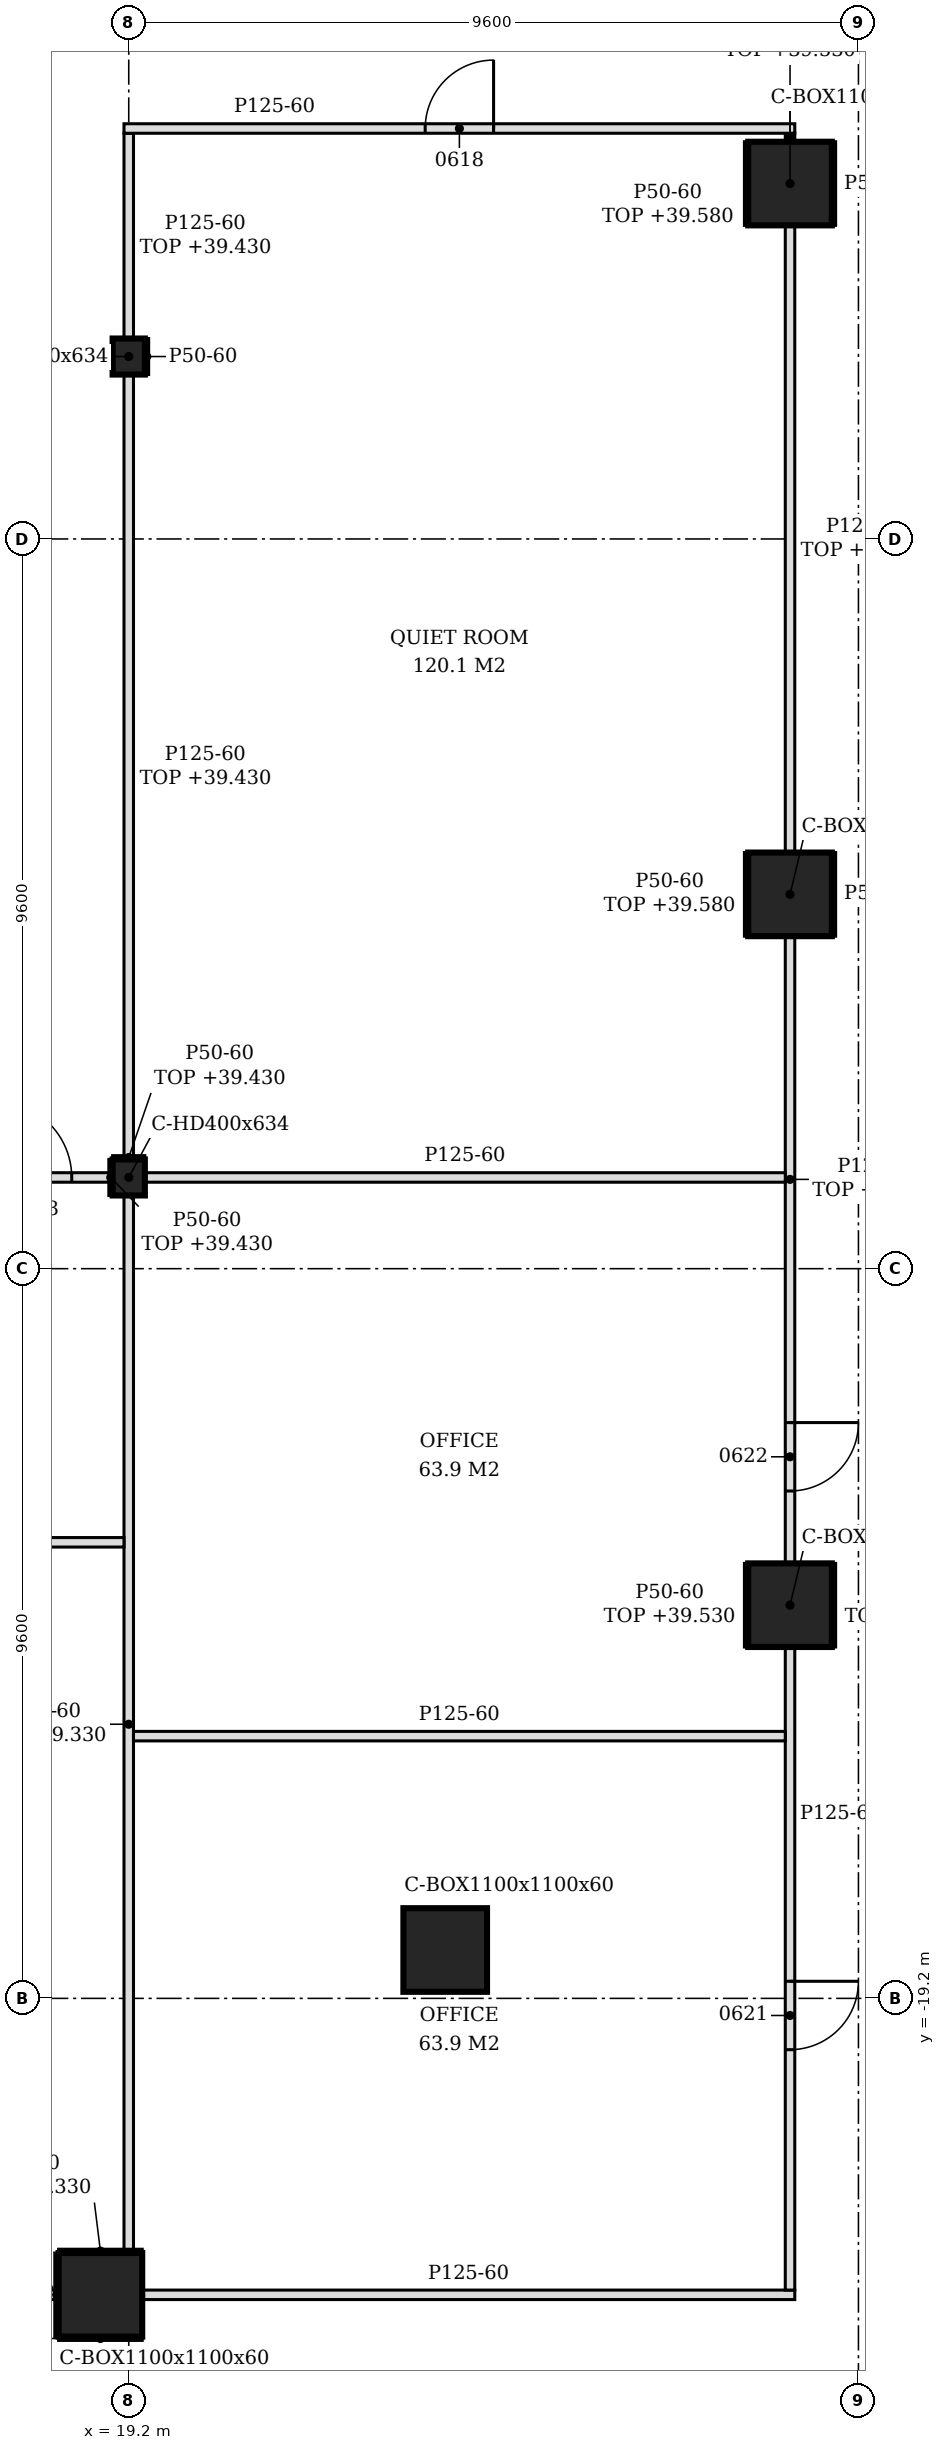
"""IFC4 building model, lengths in metres.
Left out: names, types, materials, properties, quantities, classifications, styles, units other than length and angle.
Written with IfcOpenShell. Run it as: python <this file> out.ifc"""

import sys

from ifc_helpers import new_model, si_unit, direction, frame, frame_2d, origin, origin_2d, place, context, subcontext, project, spatial, polyline, rectangle, hollow_rectangle, i_section, outline, extrude, element, fill, save


model = new_model("IFC4")
c1 = context("Model", 3, precision=1e-05, world=origin(), true_north=direction((0.0, 1.0)))
c2 = subcontext(c1, "Body", "Model", "MODEL_VIEW")
j1 = project(units=[si_unit("LENGTHUNIT", "METRE"), si_unit("PLANEANGLEUNIT", "RADIAN")], contexts=[c1])
p1 = place(None, origin())
s1 = spatial("IfcSite", under=j1, at=p1, CompositionType="ELEMENT")
p2 = place(p1, origin())
s2 = spatial("IfcBuilding", under=s1, at=p2, CompositionType="ELEMENT")
p3 = place(p2, frame((0.0, 0.0, 35.4)))
s3 = spatial("IfcBuildingStorey", under=s2, at=p3, CompositionType="ELEMENT", Elevation=35.4)
for number, where, z_axis, x_axis in (
    (1, (18.827, -23.1, -0.2), (0.0, 0.0, 1.0), (1.0, 0.0, 0.0)),
    (2, (23.364, -18.564, -0.2), (0.0, 0.0, 1.0), (1.0, 0.0, 0.0)),
    (3, (27.9, -14.027, -0.2), (0.0, 0.0, 1.0), (1.0, 0.0, 0.0)),
    (4, (27.9, -4.676, -0.2), (0.0, 0.0, 1.0), (1.0, 0.0, 0.0)),
    (5, (27.9, 4.676, -0.2), (0.0, 0.0, 1.0), (1.0, 0.0, 0.0)),
):
    element("IfcColumn", number, at=place(p3, frame(where, z_axis=z_axis, x_axis=x_axis)), inside=s3, PredefinedType="COLUMN", context=c2, shape_type="SweptSolid", body=[
        extrude(hollow_rectangle(XDim=1.1, YDim=1.1, WallThickness=0.06, at=origin_2d()), origin(), (0.0, 0.0, 1.0), 4.85),
    ])
for number, where, z_axis, x_axis in (
    (6, (19.2, -8.4, -0.2), (0.0, 0.0, 1.0), (1.0, 0.0, 0.0)),
    (7, (19.2, 2.4, -0.2), (0.0, 0.0, 1.0), (1.0, 0.0, 0.0)),
):
    element("IfcColumn", number, at=place(p3, frame(where, z_axis=z_axis, x_axis=x_axis)), inside=s3, PredefinedType="COLUMN", context=c2, shape_type="SweptSolid", body=[
        extrude(i_section(OverallWidth=0.424, OverallDepth=0.474, WebThickness=0.048, FlangeThickness=0.077, FilletRadius=0.015, at=origin_2d()), origin(), (0.0, 0.0, 1.0), 4.85),
    ])
p4 = place(p3, frame((9.964, -23.1, 0.0), z_axis=(0.0, 0.0, 1.0), x_axis=(1.0, 0.0, 0.0)))
e8 = element("IfcWall", 8, at=p4, inside=s3, PredefinedType="PARTITIONING", context=c2, shape_type="SweptSolid", body=[
    extrude(rectangle(XDim=8.313, YDim=0.125, at=frame_2d((4.157, 0.0))), origin(), (0.0, 0.0, 1.0), 4.13),
])
p5 = place(p4, frame((3.986, 0.0, 0.0)))
e9 = element("IfcOpeningElement", 9, at=p5, cuts=e8, PredefinedType="OPENING", context=c2, shape_type="SweptSolid", body=[
    extrude(rectangle(XDim=0.9, YDim=2.1, at=frame_2d((0.45, 1.05))), frame((0.0, 0.073, 0.0), z_axis=(0.0, -1.0, 0.0), x_axis=(1.0, 0.0, 0.0)), (0.0, 0.0, 1.0), 0.145),
])
p6 = place(p3, frame((19.377, -23.1, 0.0), z_axis=(0.0, 0.0, 1.0), x_axis=(1.0, 0.0, 0.0)))
e10 = element("IfcWall", 10, at=p6, inside=s3, PredefinedType="PARTITIONING", context=c2, shape_type="SweptSolid", body=[
    extrude(rectangle(XDim=8.585, YDim=0.125, at=frame_2d((4.292, 0.0))), origin(), (0.0, 0.0, 1.0), 4.65),
])
p7 = place(p3, frame((27.9, -23.038, 0.0), z_axis=(0.0, 0.0, 1.0), x_axis=(0.0, 1.0, 0.0)))
e11 = element("IfcWall", 11, at=p7, inside=s3, PredefinedType="PARTITIONING", context=c2, shape_type="SweptSolid", body=[
    extrude(outline(polyline([(0.0, 0.0), (8.46, 0.0), (8.46, 4.65), (3.988, 4.65), (3.986, 4.03), (3.688, 4.03), (3.686, 4.65), (0.0, 4.65), (0.0, 0.0)])), frame((0.0, 0.062, 0.0), z_axis=(0.0, -1.0, 0.0), x_axis=(1.0, 0.0, 0.0)), (0.0, 0.0, 1.0), 0.125),
])
p8 = place(p7, frame((3.163, 0.0, 0.0)))
e12 = element("IfcOpeningElement", 12, at=p8, cuts=e11, PredefinedType="OPENING", context=c2, shape_type="SweptSolid", body=[
    extrude(rectangle(XDim=0.9, YDim=2.1, at=frame_2d((0.45, 1.05))), frame((0.0, 0.073, 0.0), z_axis=(0.0, -1.0, 0.0), x_axis=(1.0, 0.0, 0.0)), (0.0, 0.0, 1.0), 0.145),
])
p9 = place(p3, frame((19.2, -22.55, 0.0), z_axis=(0.0, 0.0, 1.0), x_axis=(0.0, 1.0, 0.0)))
e13 = element("IfcWall", 13, at=p9, inside=s3, PredefinedType="PARTITIONING", context=c2, shape_type="SweptSolid", body=[
    extrude(rectangle(XDim=13.913, YDim=0.125, at=frame_2d((6.957, 0.0))), origin(), (0.0, 0.0, 1.0), 3.93),
])
p10 = place(p3, frame((19.262, -15.75, 0.0), z_axis=(0.0, 0.0, 1.0), x_axis=(1.0, 0.0, 0.0)))
e14 = element("IfcWall", 14, at=p10, inside=s3, PredefinedType="PARTITIONING", context=c2, shape_type="SweptSolid", body=[
    extrude(outline(polyline([(0.0, 0.0), (8.575, 0.0), (8.575, 4.65), (7.189, 4.65), (7.187, 4.13), (6.64, 4.13), (6.638, 4.65), (0.087, 4.65), (0.085, 3.93), (0.0, 3.93), (0.0, 0.0)])), frame((0.0, 0.062, 0.0), z_axis=(0.0, -1.0, 0.0), x_axis=(1.0, 0.0, 0.0)), (0.0, 0.0, 1.0), 0.125),
])
p11 = place(p3, frame((27.9, -13.477, 0.0), z_axis=(0.0, 0.0, 1.0), x_axis=(0.0, 1.0, 0.0)))
e15 = element("IfcWall", 15, at=p11, inside=s3, PredefinedType="PARTITIONING", context=c2, shape_type="SweptSolid", body=[
    extrude(rectangle(XDim=8.252, YDim=0.125, at=frame_2d((4.126, 0.0))), origin(), (0.0, 0.0, 1.0), 4.13),
])
p12 = place(p11, frame((0.952, 0.0, 0.0)))
e16 = element("IfcOpeningElement", 16, at=p12, cuts=e15, PredefinedType="OPENING", context=c2, shape_type="SweptSolid", body=[
    extrude(rectangle(XDim=0.9, YDim=2.1, at=frame_2d((0.45, 1.05))), frame((0.0, 0.073, 0.0), z_axis=(0.0, -1.0, 0.0), x_axis=(1.0, 0.0, 0.0)), (0.0, 0.0, 1.0), 0.145),
])
p13 = place(p3, frame((-4.738, -13.2, 0.0), z_axis=(0.0, 0.0, 1.0), x_axis=(1.0, 0.0, 0.0)))
e17 = element("IfcWall", 17, at=p13, inside=s3, PredefinedType="PARTITIONING", context=c2, shape_type="SweptSolid", body=[
    extrude(outline(polyline([(0.0, 0.0), (23.875, 0.0), (23.875, 3.93), (23.788, 3.93), (23.785, 4.65), (12.087, 4.65), (12.085, 3.93), (11.788, 3.93), (11.785, 4.65), (0.087, 4.65), (0.085, 3.93), (0.0, 3.93), (0.0, 0.0)])), frame((0.0, 0.062, 0.0), z_axis=(0.0, -1.0, 0.0), x_axis=(1.0, 0.0, 0.0)), (0.0, 0.0, 1.0), 0.125),
])
p14 = place(p3, frame((7.412, -8.4, 0.0), z_axis=(0.0, 0.0, 1.0), x_axis=(1.0, 0.0, 0.0)))
e18 = element("IfcWall", 18, at=p14, inside=s3, PredefinedType="PARTITIONING", context=c2, shape_type="SweptSolid", body=[
    extrude(rectangle(XDim=11.576, YDim=0.125, at=frame_2d((5.788, 0.0))), origin(), (0.0, 0.0, 1.0), 4.03),
])
p15 = place(p14, frame((4.138, 0.0, 0.0)))
e19 = element("IfcOpeningElement", 19, at=p15, cuts=e18, PredefinedType="OPENING", context=c2, shape_type="SweptSolid", body=[
    extrude(rectangle(XDim=0.8, YDim=2.1, at=frame_2d((0.4, 1.05))), frame((0.0, 0.073, 0.0), z_axis=(0.0, -1.0, 0.0), x_axis=(1.0, 0.0, 0.0)), (0.0, 0.0, 1.0), 0.145),
])
p16 = place(p14, frame((10.038, 0.0, 0.0)))
e20 = element("IfcOpeningElement", 20, at=p16, cuts=e18, PredefinedType="OPENING", context=c2, shape_type="SweptSolid", body=[
    extrude(rectangle(XDim=1.0, YDim=2.1, at=frame_2d((0.5, 1.05))), frame((0.0, 0.073, 0.0), z_axis=(0.0, -1.0, 0.0), x_axis=(1.0, 0.0, 0.0)), (0.0, 0.0, 1.0), 0.145),
])
p17 = place(p3, frame((19.412, -8.4, 0.0), z_axis=(0.0, 0.0, 1.0), x_axis=(1.0, 0.0, 0.0)))
e21 = element("IfcWall", 21, at=p17, inside=s3, PredefinedType="PARTITIONING", context=c2, shape_type="SweptSolid", body=[
    extrude(outline(polyline([(0.0, 0.0), (8.425, 0.0), (8.426, 4.13), (8.338, 4.13), (8.336, 4.65), (0.0, 4.65), (0.0, 0.0)])), frame((0.0, 0.062, 0.0), z_axis=(0.0, -1.0, 0.0), x_axis=(1.0, 0.0, 0.0)), (0.0, 0.0, 1.0), 0.125),
])
p18 = place(p3, frame((19.2, -8.163, 0.0), z_axis=(0.0, 0.0, 1.0), x_axis=(0.0, 1.0, 0.0)))
e22 = element("IfcWall", 22, at=p18, inside=s3, PredefinedType="PARTITIONING", context=c2, shape_type="SweptSolid", body=[
    extrude(rectangle(XDim=10.326, YDim=0.125, at=frame_2d((5.163, 0.0))), origin(), (0.0, 0.0, 1.0), 4.03),
])
p19 = place(p3, frame((27.9, -4.126, 0.0), z_axis=(0.0, 0.0, 1.0), x_axis=(0.0, 1.0, 0.0)))
e23 = element("IfcWall", 23, at=p19, inside=s3, PredefinedType="PARTITIONING", context=c2, shape_type="SweptSolid", body=[
    extrude(rectangle(XDim=8.251, YDim=0.125, at=frame_2d((4.126, 0.0))), origin(), (0.0, 0.0, 1.0), 4.13),
])
p20 = place(p3, frame((19.2, 2.637, 0.0), z_axis=(0.0, 0.0, 1.0), x_axis=(0.0, 1.0, 0.0)))
e24 = element("IfcWall", 24, at=p20, inside=s3, PredefinedType="PARTITIONING", context=c2, shape_type="SweptSolid", body=[
    extrude(rectangle(XDim=2.7, YDim=0.125, at=frame_2d((1.35, 0.0))), origin(), (0.0, 0.0, 1.0), 4.03),
])
p21 = place(p3, frame((27.9, 5.226, 0.0), z_axis=(0.0, 0.0, 1.0), x_axis=(0.0, 1.0, 0.0)))
e25 = element("IfcWall", 25, at=p21, inside=s3, PredefinedType="PARTITIONING", context=c2, shape_type="SweptSolid", body=[
    extrude(rectangle(XDim=0.112, YDim=0.125, at=frame_2d((0.056, 0.0))), origin(), (0.0, 0.0, 1.0), 4.13),
])
p22 = place(p3, frame((19.137, 5.4, 0.0), z_axis=(0.0, 0.0, 1.0), x_axis=(1.0, 0.0, 0.0)))
e26 = element("IfcWall", 26, at=p22, inside=s3, PredefinedType="PARTITIONING", context=c2, shape_type="SweptSolid", body=[
    extrude(outline(polyline([(0.0, 0.0), (8.825, 0.0), (8.825, 4.13), (8.613, 4.13), (8.611, 4.65), (0.212, 4.65), (0.21, 4.03), (0.0, 4.03), (0.0, 0.0)])), frame((0.0, 0.062, 0.0), z_axis=(0.0, -1.0, 0.0), x_axis=(1.0, 0.0, 0.0)), (0.0, 0.0, 1.0), 0.125),
])
p23 = place(p22, frame((3.962, 0.0, 0.0)))
e27 = element("IfcOpeningElement", 27, at=p23, cuts=e26, PredefinedType="OPENING", context=c2, shape_type="SweptSolid", body=[
    extrude(rectangle(XDim=0.9, YDim=2.1, at=frame_2d((0.45, 1.05))), frame((0.0, 0.073, 0.0), z_axis=(0.0, -1.0, 0.0), x_axis=(1.0, 0.0, 0.0)), (0.0, 0.0, 1.0), 0.145),
])
p24 = place(p3, frame((18.277, -22.525, 0.0), z_axis=(0.0, 0.0, 1.0), x_axis=(1.0, 0.0, 0.0)))
e28 = element("IfcWall", 28, at=p24, inside=s3, PredefinedType="PARTITIONING", context=c2, shape_type="SweptSolid", body=[
    extrude(rectangle(XDim=1.1, YDim=0.05, at=frame_2d((0.55, 0.0))), origin(), (0.0, 0.0, 1.0), 3.93),
])
p25 = place(p3, frame((18.277, -23.675, 0.0), z_axis=(0.0, 0.0, 1.0), x_axis=(1.0, 0.0, 0.0)))
e29 = element("IfcWall", 29, at=p25, inside=s3, PredefinedType="PARTITIONING", context=c2, shape_type="SweptSolid", body=[
    extrude(rectangle(XDim=1.1, YDim=0.05, at=frame_2d((0.55, 0.0))), origin(), (0.0, 0.0, 1.0), 4.27),
])
p26 = place(p3, frame((18.252, -23.65, 0.0), z_axis=(0.0, 0.0, 1.0), x_axis=(0.0, 1.0, 0.0)))
e30 = element("IfcWall", 30, at=p26, inside=s3, PredefinedType="PARTITIONING", context=c2, shape_type="SweptSolid", body=[
    extrude(rectangle(XDim=1.1, YDim=0.05, at=frame_2d((0.55, 0.0))), origin(), (0.0, 0.0, 1.0), 4.13),
])
p27 = place(p3, frame((18.963, -8.637, 0.0), z_axis=(0.0, 0.0, 1.0), x_axis=(0.0, 1.0, 0.0)))
e31 = element("IfcWall", 31, at=p27, inside=s3, PredefinedType="PARTITIONING", context=c2, shape_type="SweptSolid", body=[
    extrude(rectangle(XDim=0.474, YDim=0.05, at=frame_2d((0.237, 0.0))), origin(), (0.0, 0.0, 1.0), 4.03),
])
for number, where, z_axis, x_axis in (
    (32, (27.325, -14.577, 0.0), (0.0, 0.0, 1.0), (0.0, 1.0, 0.0)),
    (33, (28.475, -14.577, 0.0), (0.0, 0.0, 1.0), (0.0, 1.0, 0.0)),
):
    element("IfcWall", number, at=place(p3, frame(where, z_axis=z_axis, x_axis=x_axis)), inside=s3, PredefinedType="PARTITIONING", context=c2, shape_type="SweptSolid", body=[
        extrude(rectangle(XDim=1.1, YDim=0.05, at=frame_2d((0.55, 0.0))), origin(), (0.0, 0.0, 1.0), 4.13),
    ])
p28 = place(p3, frame((27.325, -5.226, 0.0), z_axis=(0.0, 0.0, 1.0), x_axis=(0.0, 1.0, 0.0)))
e34 = element("IfcWall", 34, at=p28, inside=s3, PredefinedType="PARTITIONING", context=c2, shape_type="SweptSolid", body=[
    extrude(rectangle(XDim=1.1, YDim=0.05, at=frame_2d((0.55, 0.0))), origin(), (0.0, 0.0, 1.0), 4.18),
])
p29 = place(p3, frame((28.475, -5.226, 0.0), z_axis=(0.0, 0.0, 1.0), x_axis=(0.0, 1.0, 0.0)))
e35 = element("IfcWall", 35, at=p29, inside=s3, PredefinedType="PARTITIONING", context=c2, shape_type="SweptSolid", body=[
    extrude(rectangle(XDim=1.1, YDim=0.05, at=frame_2d((0.55, 0.0))), origin(), (0.0, 0.0, 1.0), 4.65),
])
p30 = place(p3, frame((27.325, 4.126, 0.0), z_axis=(0.0, 0.0, 1.0), x_axis=(0.0, 1.0, 0.0)))
e36 = element("IfcWall", 36, at=p30, inside=s3, PredefinedType="PARTITIONING", context=c2, shape_type="SweptSolid", body=[
    extrude(rectangle(XDim=1.1, YDim=0.05, at=frame_2d((0.55, 0.0))), origin(), (0.0, 0.0, 1.0), 4.18),
])
p31 = place(p3, frame((28.475, 4.126, 0.0), z_axis=(0.0, 0.0, 1.0), x_axis=(0.0, 1.0, 0.0)))
e37 = element("IfcWall", 37, at=p31, inside=s3, PredefinedType="PARTITIONING", context=c2, shape_type="SweptSolid", body=[
    extrude(rectangle(XDim=1.1, YDim=0.05, at=frame_2d((0.55, 0.0))), origin(), (0.0, 0.0, 1.0), 4.65),
])
p32 = place(p3, frame((18.988, -8.138, 0.0), z_axis=(0.0, 0.0, 1.0), x_axis=(1.0, 0.0, 0.0)))
e38 = element("IfcWall", 38, at=p32, inside=s3, PredefinedType="PARTITIONING", context=c2, shape_type="SweptSolid", body=[
    extrude(rectangle(XDim=0.424, YDim=0.05, at=frame_2d((0.212, 0.0))), origin(), (0.0, 0.0, 1.0), 4.03),
])
p33 = place(p3, frame((19.437, 2.163, 0.0), z_axis=(0.0, 0.0, 1.0), x_axis=(0.0, 1.0, 0.0)))
e39 = element("IfcWall", 39, at=p33, inside=s3, PredefinedType="PARTITIONING", context=c2, shape_type="SweptSolid", body=[
    extrude(rectangle(XDim=0.474, YDim=0.05, at=frame_2d((0.237, 0.0))), origin(), (0.0, 0.0, 1.0), 4.65),
])
p34 = place(p16, origin())
e40 = element("IfcDoor", 40, at=p34, inside=s3, OperationType="SINGLE_SWING_LEFT", PredefinedType="DOOR", context=c2, shape_type="SweptSolid", body=[
    extrude(rectangle(XDim=1.0, YDim=2.1, at=frame_2d((0.5, 1.05))), frame((0.0, 0.025, 0.0), z_axis=(0.0, -1.0, 0.0), x_axis=(1.0, 0.0, 0.0)), (0.0, 0.0, 1.0), 0.05),
])
fill(e20, e40)
p35 = place(p23, origin())
e41 = element("IfcDoor", 41, at=p35, inside=s3, OperationType="SINGLE_SWING_RIGHT", PredefinedType="DOOR", context=c2, shape_type="SweptSolid", body=[
    extrude(rectangle(XDim=0.9, YDim=2.1, at=frame_2d((0.45, 1.05))), frame((0.0, 0.025, 0.0), z_axis=(0.0, -1.0, 0.0), x_axis=(1.0, 0.0, 0.0)), (0.0, 0.0, 1.0), 0.05),
])
fill(e27, e41)
p36 = place(p8, frame((0.9, 0.0, 0.0), z_axis=(0.0, 0.0, 1.0), x_axis=(-1.0, 0.0, 0.0)))
e42 = element("IfcDoor", 42, at=p36, inside=s3, OperationType="SINGLE_SWING_LEFT", PredefinedType="DOOR", context=c2, shape_type="SweptSolid", body=[
    extrude(rectangle(XDim=0.9, YDim=2.1, at=frame_2d((0.45, 1.05))), frame((0.0, 0.025, 0.0), z_axis=(0.0, -1.0, 0.0), x_axis=(1.0, 0.0, 0.0)), (0.0, 0.0, 1.0), 0.05),
])
fill(e12, e42)
p37 = place(p12, frame((0.9, 0.0, 0.0), z_axis=(0.0, 0.0, 1.0), x_axis=(-1.0, 0.0, 0.0)))
e43 = element("IfcDoor", 43, at=p37, inside=s3, OperationType="SINGLE_SWING_LEFT", PredefinedType="DOOR", context=c2, shape_type="SweptSolid", body=[
    extrude(rectangle(XDim=0.9, YDim=2.1, at=frame_2d((0.45, 1.05))), frame((0.0, 0.025, 0.0), z_axis=(0.0, -1.0, 0.0), x_axis=(1.0, 0.0, 0.0)), (0.0, 0.0, 1.0), 0.05),
])
fill(e16, e43)
save(model, sys.argv[1])
